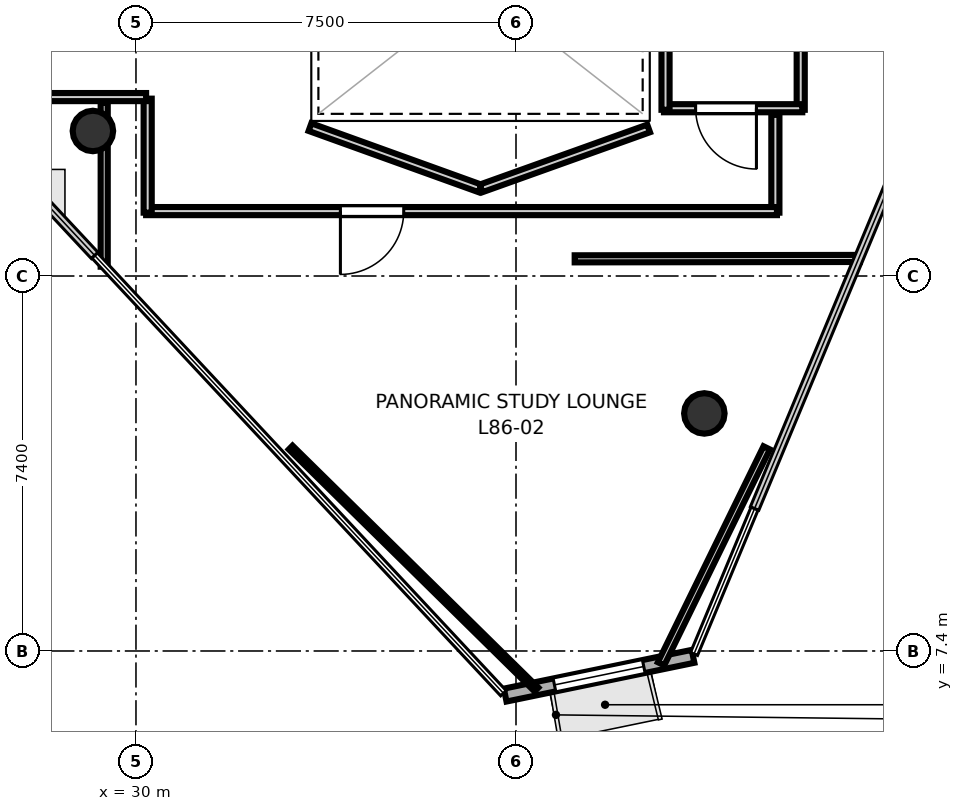
"""IFC4 building model, lengths in metres.
Left out: names, types, materials, properties, quantities, classifications, styles, units other than length and angle.
Written with IfcOpenShell. Run it as: python <this file> out.ifc"""

import sys

from ifc_helpers import new_model, si_unit, direction, frame, frame_2d, origin, origin_2d, place, context, subcontext, project, spatial, rectangle, hollow_circle, extrude, element, fill, save


model = new_model("IFC4")
c1 = context("Model", 3, precision=1e-05, world=origin(), true_north=direction((0.0, 1.0)))
c2 = subcontext(c1, "Body", "Model", "MODEL_VIEW")
j1 = project(units=[si_unit("LENGTHUNIT", "METRE"), si_unit("PLANEANGLEUNIT", "RADIAN")], contexts=[c1])
p1 = place(None, origin())
s1 = spatial("IfcSite", under=j1, at=p1, CompositionType="ELEMENT")
p2 = place(p1, origin())
s2 = spatial("IfcBuilding", under=s1, at=p2, CompositionType="ELEMENT")
p3 = place(p2, frame((0.0, 0.0, 333.3)))
s3 = spatial("IfcBuildingStorey", under=s2, at=p3, CompositionType="ELEMENT", Elevation=333.3)
for number, where, z_axis, x_axis in (
    (1, (29.15, 17.662, 0.0), (0.0, 0.0, 1.0), (1.0, 0.0, 0.0)),
    (2, (41.217, 12.088, 0.0), (0.0, 0.0, 1.0), (1.0, 0.0, 0.0)),
):
    element("IfcColumn", number, at=place(p3, frame(where, z_axis=z_axis, x_axis=x_axis)), inside=s3, PredefinedType="COLUMN", context=c2, shape_type="SweptSolid", body=[
        extrude(hollow_circle(Radius=0.4, WallThickness=0.022, at=origin_2d()), origin(), (0.0, 0.0, 1.0), 3.7),
    ])
p4 = place(p3, frame((37.286, 6.53, 0.0), z_axis=(0.0, 0.0, 1.0), x_axis=(0.979387300464, 0.201991375283, 0.0)))
e3 = element("IfcWall", 3, at=p4, inside=s3, PredefinedType="SOLIDWALL", context=c2, shape_type="SweptSolid", body=[
    extrude(rectangle(XDim=3.786, YDim=0.26, at=frame_2d((1.893, 0.0))), origin(), (0.0, 0.0, 1.0), 3.52),
])
p5 = place(p4, frame((0.993, 0.0, 0.85)))
e4 = element("IfcOpeningElement", 4, at=p5, cuts=e3, PredefinedType="OPENING", context=c2, shape_type="SweptSolid", body=[
    extrude(rectangle(XDim=1.8, YDim=2.1, at=frame_2d((0.9, 1.05))), frame((0.0, 0.14, 0.0), z_axis=(0.0, -1.0, 0.0), x_axis=(1.0, 0.0, 0.0)), (0.0, 0.0, 1.0), 0.28),
])
p6 = place(p3, frame((43.119, 22.05, 0.0), z_axis=(0.0, 0.0, 1.0), x_axis=(0.0, -1.0, 0.0)))
e5 = element("IfcWall", 5, at=p6, inside=s3, PredefinedType="PARTITIONING", context=c2, shape_type="SweptSolid", body=[
    extrude(rectangle(XDim=3.97, YDim=0.16, at=frame_2d((1.985, 0.0))), origin(), (0.0, 0.0, 1.0), 2.84),
])
p7 = place(p6, frame((0.66, 0.0, 0.0)))
e6 = element("IfcOpeningElement", 6, at=p7, cuts=e5, PredefinedType="OPENING", context=c2, shape_type="SweptSolid", body=[
    extrude(rectangle(XDim=1.25, YDim=2.2, at=frame_2d((0.625, 1.1))), frame((0.0, 0.09, 0.0), z_axis=(0.0, -1.0, 0.0), x_axis=(1.0, 0.0, 0.0)), (0.0, 0.0, 1.0), 0.18),
])
p8 = place(p3, frame((43.15, 18.111, 0.0), z_axis=(0.0, 0.0, 1.0), x_axis=(-1.0, 0.0, 0.0)))
e7 = element("IfcWall", 7, at=p8, inside=s3, PredefinedType="PARTITIONING", context=c2, shape_type="SweptSolid", body=[
    extrude(rectangle(XDim=2.73, YDim=0.16, at=frame_2d((1.365, 0.0))), origin(), (0.0, 0.0, 1.0), 2.84),
])
p9 = place(p8, frame((0.905, 0.0, 0.0)))
e8 = element("IfcOpeningElement", 8, at=p9, cuts=e7, PredefinedType="OPENING", context=c2, shape_type="SweptSolid", body=[
    extrude(rectangle(XDim=1.2, YDim=2.15, at=frame_2d((0.6, 1.075))), frame((0.0, 0.09, 0.0), z_axis=(0.0, -1.0, 0.0), x_axis=(1.0, 0.0, 0.0)), (0.0, 0.0, 1.0), 0.18),
])
p10 = place(p3, frame((40.451, 18.08, 0.0), z_axis=(0.0, 0.0, 1.0), x_axis=(0.0, 1.0, 0.0)))
e9 = element("IfcWall", 9, at=p10, inside=s3, PredefinedType="PARTITIONING", context=c2, shape_type="SweptSolid", body=[
    extrude(rectangle(XDim=3.32, YDim=0.16, at=frame_2d((1.66, 0.0))), origin(), (0.0, 0.0, 1.0), 2.84),
])
p11 = place(p3, frame((33.434, 17.738, 0.0), z_axis=(0.0, 0.0, 1.0), x_axis=(0.940782662834, -0.339010296764, 0.0)))
e10 = element("IfcWall", 10, at=p11, inside=s3, PredefinedType="PARTITIONING", context=c2, shape_type="SweptSolid", body=[
    extrude(rectangle(XDim=3.567, YDim=0.16, at=frame_2d((1.783, 0.0))), origin(), (0.0, 0.0, 1.0), 2.84),
])
p12 = place(p3, frame((36.81, 16.529, 0.0), z_axis=(0.0, 0.0, 1.0), x_axis=(0.941548344365, 0.33687789364, 0.0)))
e11 = element("IfcWall", 11, at=p12, inside=s3, PredefinedType="PARTITIONING", context=c2, shape_type="SweptSolid", body=[
    extrude(rectangle(XDim=3.513, YDim=0.16, at=frame_2d((1.756, 0.0))), origin(), (0.0, 0.0, 1.0), 2.84),
])
p13 = place(p3, frame((42.619, 17.98, 0.0), z_axis=(0.0, 0.0, 1.0), x_axis=(0.0, -1.0, 0.0)))
e12 = element("IfcWall", 12, at=p13, inside=s3, PredefinedType="PARTITIONING", context=c2, shape_type="SweptSolid", body=[
    extrude(rectangle(XDim=1.93, YDim=0.16, at=frame_2d((0.965, 0.0))), origin(), (0.0, 0.0, 1.0), 2.84),
])
p14 = place(p3, frame((42.65, 16.081, 0.0), z_axis=(0.0, 0.0, 1.0), x_axis=(-1.0, 0.0, 0.0)))
e13 = element("IfcWall", 13, at=p14, inside=s3, PredefinedType="PARTITIONING", context=c2, shape_type="SweptSolid", body=[
    extrude(rectangle(XDim=12.45, YDim=0.16, at=frame_2d((6.225, 0.0))), origin(), (0.0, 0.0, 1.0), 2.84),
])
p15 = place(p14, frame((7.365, 0.0, 0.0)))
e14 = element("IfcOpeningElement", 14, at=p15, cuts=e13, PredefinedType="OPENING", context=c2, shape_type="SweptSolid", body=[
    extrude(rectangle(XDim=1.25, YDim=2.2, at=frame_2d((0.625, 1.1))), frame((0.0, 0.09, 0.0), z_axis=(0.0, -1.0, 0.0), x_axis=(1.0, 0.0, 0.0)), (0.0, 0.0, 1.0), 0.18),
])
p16 = place(p3, frame((30.231, 16.05, 0.0), z_axis=(0.0, 0.0, 1.0), x_axis=(0.0, 1.0, 0.0)))
e15 = element("IfcWall", 15, at=p16, inside=s3, PredefinedType="PARTITIONING", context=c2, shape_type="SweptSolid", body=[
    extrude(rectangle(XDim=2.25, YDim=0.16, at=frame_2d((1.125, 0.0))), origin(), (0.0, 0.0, 1.0), 2.84),
])
p17 = place(p3, frame((30.2, 18.331, 0.0), z_axis=(0.0, 0.0, 1.0), x_axis=(-1.0, 0.0, 0.0)))
e16 = element("IfcWall", 16, at=p17, inside=s3, PredefinedType="PARTITIONING", context=c2, shape_type="SweptSolid", body=[
    extrude(rectangle(XDim=3.954, YDim=0.16, at=frame_2d((1.977, 0.0))), origin(), (0.0, 0.0, 1.0), 2.84),
])
p18 = place(p3, frame((42.448, 11.409, 0.0), z_axis=(0.0, 0.0, 1.0), x_axis=(-0.43937441441, -0.898304026464, 0.0)))
e17 = element("IfcWall", 17, at=p18, inside=s3, PredefinedType="PARTITIONING", context=c2, shape_type="SweptSolid", body=[
    extrude(rectangle(XDim=4.744, YDim=0.14, at=frame_2d((2.372, 0.0))), origin(), (0.0, 0.0, 1.0), 2.84),
])
p19 = place(p3, frame((37.903, 6.639, 0.0), z_axis=(0.0, 0.0, 1.0), x_axis=(-0.712590818951, 0.701579877667, 0.0)))
e18 = element("IfcWall", 18, at=p19, inside=s3, PredefinedType="PARTITIONING", context=c2, shape_type="SweptSolid", body=[
    extrude(rectangle(XDim=6.807, YDim=0.105, at=frame_2d((3.403, 0.0))), origin(), (0.0, 0.0, 1.0), 2.84),
])
p20 = place(p3, frame((29.373, 14.984, 0.0), z_axis=(0.0, 0.0, 1.0), x_axis=(0.0, 1.0, 0.0)))
e19 = element("IfcWall", 19, at=p20, inside=s3, PredefinedType="PARTITIONING", context=c2, shape_type="SweptSolid", body=[
    extrude(rectangle(XDim=3.236, YDim=0.14, at=frame_2d((1.618, 0.0))), origin(), (0.0, 0.0, 1.0), 2.84),
])
p21 = place(p3, frame((38.658, 15.139, 0.0), z_axis=(0.0, 0.0, 1.0), x_axis=(0.99999909507, 0.001345309723, 0.0)))
e20 = element("IfcWall", 20, at=p21, inside=s3, PredefinedType="PARTITIONING", context=c2, shape_type="SweptSolid", body=[
    extrude(rectangle(XDim=5.626, YDim=0.14, at=frame_2d((2.813, 0.0))), origin(), (0.0, 0.0, 1.0), 2.84),
])
p22 = place(p9, origin())
e21 = element("IfcDoor", 21, at=p22, inside=s3, OperationType="SINGLE_SWING_LEFT", PredefinedType="DOOR", context=c2, shape_type="SweptSolid", body=[
    extrude(rectangle(XDim=1.2, YDim=2.15, at=frame_2d((0.6, 1.075))), frame((0.0, 0.025, 0.0), z_axis=(0.0, -1.0, 0.0), x_axis=(1.0, 0.0, 0.0)), (0.0, 0.0, 1.0), 0.05),
])
fill(e8, e21)
p23 = place(p15, origin())
e22 = element("IfcDoor", 22, at=p23, inside=s3, OperationType="SINGLE_SWING_RIGHT", PredefinedType="DOOR", context=c2, shape_type="SweptSolid", body=[
    extrude(rectangle(XDim=1.25, YDim=2.2, at=frame_2d((0.625, 1.1))), frame((0.0, 0.025, 0.0), z_axis=(0.0, -1.0, 0.0), x_axis=(1.0, 0.0, 0.0)), (0.0, 0.0, 1.0), 0.05),
])
fill(e14, e22)
p24 = place(p5, origin())
e23 = element("IfcWindow", 23, at=p24, inside=s3, PartitioningType="SINGLE_PANEL", PredefinedType="WINDOW", context=c2, shape_type="SweptSolid", body=[
    extrude(rectangle(XDim=1.8, YDim=2.1, at=frame_2d((0.9, 1.05))), frame((0.0, 0.03, 0.0), z_axis=(0.0, -1.0, 0.0), x_axis=(1.0, 0.0, 0.0)), (0.0, 0.0, 1.0), 0.06),
])
fill(e4, e23)
save(model, sys.argv[1])
